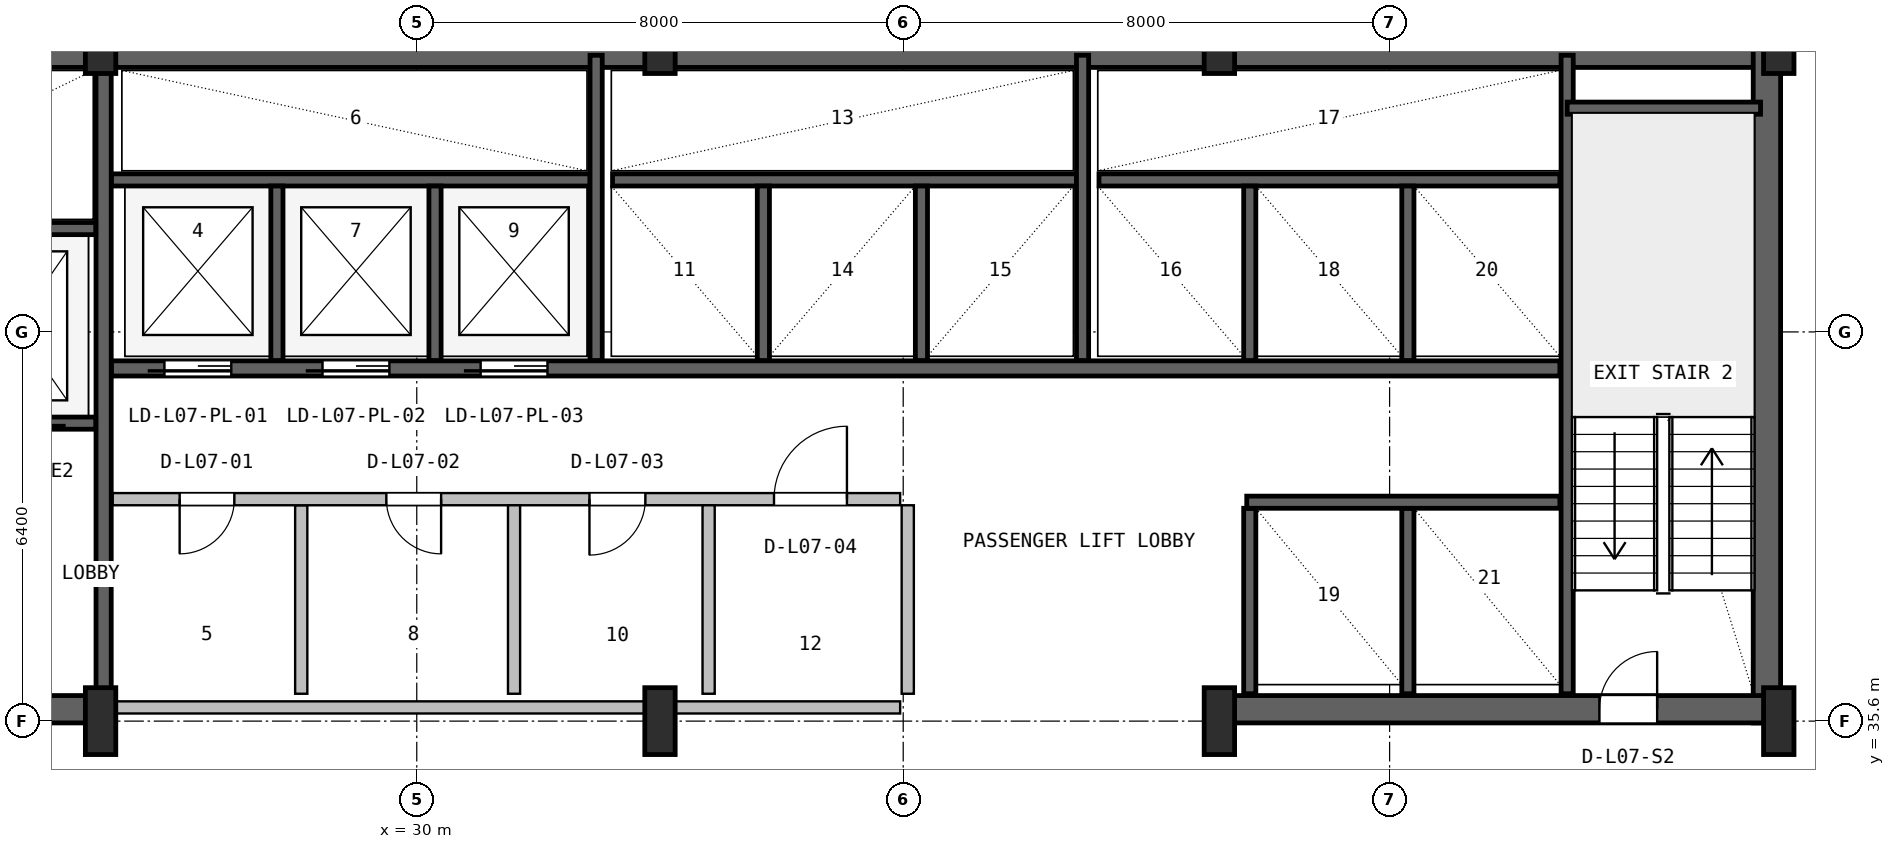
"""IFC4 building model, lengths in metres.
Left out: names, types, materials, properties, quantities, classifications, styles, units other than length and angle.
Written with IfcOpenShell. Run it as: python <this file> out.ifc"""

import sys

from ifc_helpers import new_model, si_unit, direction, frame, frame_2d, origin, origin_2d, place, context, subcontext, project, spatial, rectangle, i_section, extrude, source, transform, mapped, element, fill, save


model = new_model("IFC4")
c1 = context("Model", 3, precision=1e-05, world=origin(), true_north=direction((0.0, 1.0)))
c2 = subcontext(c1, "Body", "Model", "MODEL_VIEW")
j1 = project(units=[si_unit("LENGTHUNIT", "METRE"), si_unit("PLANEANGLEUNIT", "RADIAN")], contexts=[c1])
p1 = place(None, origin())
s1 = spatial("IfcSite", under=j1, at=p1, CompositionType="ELEMENT")
p2 = place(p1, origin())
s2 = spatial("IfcBuilding", under=s1, at=p2, CompositionType="ELEMENT")
p3 = place(p2, frame((0.0, 0.0, 35.4)))
s3 = spatial("IfcBuildingStorey", under=s2, at=p3, CompositionType="ELEMENT", Elevation=35.4)
p4 = place(p3, frame((15.6, 46.575, 0.0), z_axis=(0.0, 0.0, 1.0), x_axis=(1.0, 0.0, 0.0)))
e1 = element("IfcWall", 1, at=p4, inside=s3, PredefinedType="SHEAR", context=c2, shape_type="SweptSolid", body=[
    extrude(rectangle(XDim=36.8, YDim=0.45, at=frame_2d((18.4, 0.0))), origin(), (0.0, 0.0, 1.0), 3.65),
])
p5 = place(p3, frame((52.205, 35.57, 0.0), z_axis=(0.0, 0.0, 1.0), x_axis=(0.0, 1.0, 0.0)))
e2 = element("IfcWall", 2, at=p5, inside=s3, PredefinedType="SHEAR", context=c2, shape_type="SweptSolid", body=[
    extrude(rectangle(XDim=11.23, YDim=0.45, at=frame_2d((5.615, 0.0))), origin(), (0.0, 0.0, 1.0), 3.65),
])
p6 = place(p3, frame((15.57, 35.795, 0.0), z_axis=(0.0, 0.0, 1.0), x_axis=(1.0, 0.0, 0.0)))
e3 = element("IfcWall", 3, at=p6, inside=s3, PredefinedType="SHEAR", context=c2, shape_type="SweptSolid", body=[
    extrude(rectangle(XDim=9.23, YDim=0.45, at=frame_2d((4.615, 0.0))), origin(), (0.0, 0.0, 1.0), 3.65),
])
p7 = place(p6, frame((5.4, 0.0, 0.0)))
e4 = element("IfcOpeningElement", 4, at=p7, cuts=e3, PredefinedType="OPENING", context=c2, shape_type="SweptSolid", body=[
    extrude(rectangle(XDim=1.0, YDim=2.1, at=frame_2d((0.5, 1.05))), frame((0.0, 0.235, 0.0), z_axis=(0.0, -1.0, 0.0), x_axis=(1.0, 0.0, 0.0)), (0.0, 0.0, 1.0), 0.47),
])
p8 = place(p3, frame((43.2, 35.795, 0.0), z_axis=(0.0, 0.0, 1.0), x_axis=(1.0, 0.0, 0.0)))
e5 = element("IfcWall", 5, at=p8, inside=s3, PredefinedType="SHEAR", context=c2, shape_type="SweptSolid", body=[
    extrude(rectangle(XDim=9.23, YDim=0.45, at=frame_2d((4.615, 0.0))), origin(), (0.0, 0.0, 1.0), 3.65),
])
p9 = place(p8, frame((6.25, 0.0, 0.0)))
e6 = element("IfcOpeningElement", 6, at=p9, cuts=e5, PredefinedType="OPENING", context=c2, shape_type="SweptSolid", body=[
    extrude(rectangle(XDim=0.95, YDim=2.1, at=frame_2d((0.475, 1.05))), frame((0.0, 0.235, 0.0), z_axis=(0.0, -1.0, 0.0), x_axis=(1.0, 0.0, 0.0)), (0.0, 0.0, 1.0), 0.47),
])
m1 = source(origin(), c2, "Body", "SweptSolid", [
    extrude(i_section(OverallWidth=0.5, OverallDepth=1.1, WebThickness=0.018, FlangeThickness=0.032, FilletRadius=0.018, at=origin_2d()), origin(), (0.0, 0.0, 1.0), 3.9),
])
for number, where, z_axis, x_axis in (
    (7, (24.8, 35.6, 0.0), (0.0, 0.0, 1.0), (1.0, 0.0, 0.0)),
    (8, (24.8, 46.8, 0.0), (0.0, 0.0, 1.0), (1.0, 0.0, 0.0)),
    (9, (34.0, 35.6, 0.0), (0.0, 0.0, 1.0), (1.0, 0.0, 0.0)),
    (10, (34.0, 46.8, 0.0), (0.0, 0.0, 1.0), (1.0, 0.0, 0.0)),
    (11, (43.2, 35.6, 0.0), (0.0, 0.0, 1.0), (1.0, 0.0, 0.0)),
    (12, (43.2, 46.8, 0.0), (0.0, 0.0, 1.0), (1.0, 0.0, 0.0)),
    (13, (52.4, 35.6, 0.0), (0.0, 0.0, 1.0), (1.0, 0.0, 0.0)),
    (14, (52.4, 46.8, 0.0), (0.0, 0.0, 1.0), (1.0, 0.0, 0.0)),
):
    element("IfcColumn", number, at=place(p3, frame(where, z_axis=z_axis, x_axis=x_axis)), inside=s3, PredefinedType="COLUMN", context=c2, shape_type="MappedRepresentation", body=[
        mapped(m1, transform((0.0, 0.0, 0.0), x_axis=(1.0, 0.0, 0.0), y_axis=(0.0, 1.0, 0.0), z_axis=(0.0, 0.0, 1.0), scale=1.0)),
    ])
p10 = place(p3, frame((24.85, 36.05, 0.0), z_axis=(0.0, 0.0, 1.0), x_axis=(0.0, 1.0, 0.0)))
e15 = element("IfcWall", 15, at=p10, inside=s3, PredefinedType="SHEAR", context=c2, shape_type="SweptSolid", body=[
    extrude(rectangle(XDim=10.45, YDim=0.25, at=frame_2d((5.225, 0.0))), origin(), (0.0, 0.0, 1.0), 3.65),
])
p11 = place(p3, frame((19.2, 40.5, 0.0), z_axis=(0.0, 0.0, 1.0), x_axis=(1.0, 0.0, 0.0)))
e16 = element("IfcWall", 16, at=p11, inside=s3, PredefinedType="SHEAR", context=c2, shape_type="SweptSolid", body=[
    extrude(rectangle(XDim=5.52, YDim=0.2, at=frame_2d((2.76, 0.0))), origin(), (0.0, 0.0, 1.0), 3.65),
])
p12 = place(p11, frame((1.05, 0.0, 0.0)))
e17 = element("IfcOpeningElement", 17, at=p12, cuts=e16, PredefinedType="OPENING", context=c2, shape_type="SweptSolid", body=[
    extrude(rectangle(XDim=1.1, YDim=2.18, at=frame_2d((0.55, 1.09))), frame((0.0, 0.11, 0.0), z_axis=(0.0, -1.0, 0.0), x_axis=(1.0, 0.0, 0.0)), (0.0, 0.0, 1.0), 0.22),
])
p13 = place(p11, frame((3.65, 0.0, 0.0)))
e18 = element("IfcOpeningElement", 18, at=p13, cuts=e16, PredefinedType="OPENING", context=c2, shape_type="SweptSolid", body=[
    extrude(rectangle(XDim=1.1, YDim=2.18, at=frame_2d((0.55, 1.09))), frame((0.0, 0.11, 0.0), z_axis=(0.0, -1.0, 0.0), x_axis=(1.0, 0.0, 0.0)), (0.0, 0.0, 1.0), 0.22),
])
p14 = place(p3, frame((19.2, 43.7, 0.0), z_axis=(0.0, 0.0, 1.0), x_axis=(1.0, 0.0, 0.0)))
e19 = element("IfcWall", 19, at=p14, inside=s3, PredefinedType="SHEAR", context=c2, shape_type="SweptSolid", body=[
    extrude(rectangle(XDim=5.52, YDim=0.2, at=frame_2d((2.76, 0.0))), origin(), (0.0, 0.0, 1.0), 3.65),
])
p15 = place(p3, frame((48.92, 36.05, 0.0), z_axis=(0.0, 0.0, 1.0), x_axis=(0.0, 1.0, 0.0)))
e20 = element("IfcWall", 20, at=p15, inside=s3, PredefinedType="SHEAR", context=c2, shape_type="SweptSolid", body=[
    extrude(rectangle(XDim=10.5, YDim=0.2, at=frame_2d((5.25, 0.0))), origin(), (0.0, 0.0, 1.0), 3.65),
])
p16 = place(p3, frame((48.92, 45.68, 0.0), z_axis=(0.0, 0.0, 1.0), x_axis=(1.0, 0.0, 0.0)))
e21 = element("IfcWall", 21, at=p16, inside=s3, PredefinedType="SHEAR", context=c2, shape_type="SweptSolid", body=[
    extrude(rectangle(XDim=3.18, YDim=0.2, at=frame_2d((1.59, 0.0))), origin(), (0.0, 0.0, 1.0), 3.65),
])
p17 = place(p3, frame((24.98, 41.4, 0.0), z_axis=(0.0, 0.0, 1.0), x_axis=(1.0, 0.0, 0.0)))
e22 = element("IfcWall", 22, at=p17, inside=s3, PredefinedType="SHEAR", context=c2, shape_type="SweptSolid", body=[
    extrude(rectangle(XDim=23.82, YDim=0.25, at=frame_2d((11.91, 0.0))), origin(), (0.0, 0.0, 1.0), 3.65),
])
p18 = place(p17, frame((0.87, 0.0, 0.0)))
e23 = element("IfcOpeningElement", 23, at=p18, cuts=e22, PredefinedType="OPENING", context=c2, shape_type="SweptSolid", body=[
    extrude(rectangle(XDim=1.1, YDim=2.18, at=frame_2d((0.55, 1.09))), frame((0.0, 0.135, 0.0), z_axis=(0.0, -1.0, 0.0), x_axis=(1.0, 0.0, 0.0)), (0.0, 0.0, 1.0), 0.27),
])
p19 = place(p17, frame((3.47, 0.0, 0.0)))
e24 = element("IfcOpeningElement", 24, at=p19, cuts=e22, PredefinedType="OPENING", context=c2, shape_type="SweptSolid", body=[
    extrude(rectangle(XDim=1.1, YDim=2.18, at=frame_2d((0.55, 1.09))), frame((0.0, 0.135, 0.0), z_axis=(0.0, -1.0, 0.0), x_axis=(1.0, 0.0, 0.0)), (0.0, 0.0, 1.0), 0.27),
])
p20 = place(p17, frame((6.07, 0.0, 0.0)))
e25 = element("IfcOpeningElement", 25, at=p20, cuts=e22, PredefinedType="OPENING", context=c2, shape_type="SweptSolid", body=[
    extrude(rectangle(XDim=1.1, YDim=2.18, at=frame_2d((0.55, 1.09))), frame((0.0, 0.135, 0.0), z_axis=(0.0, -1.0, 0.0), x_axis=(1.0, 0.0, 0.0)), (0.0, 0.0, 1.0), 0.27),
])
p21 = place(p3, frame((24.98, 44.5, 0.0), z_axis=(0.0, 0.0, 1.0), x_axis=(1.0, 0.0, 0.0)))
e26 = element("IfcWall", 26, at=p21, inside=s3, PredefinedType="SHEAR", context=c2, shape_type="SweptSolid", body=[
    extrude(rectangle(XDim=7.87, YDim=0.2, at=frame_2d((3.935, 0.0))), origin(), (0.0, 0.0, 1.0), 3.65),
])
for number, where, z_axis, x_axis in (
    (27, (27.7, 41.53, 0.0), (0.0, 0.0, 1.0), (0.0, 1.0, 0.0)),
    (28, (30.3, 41.53, 0.0), (0.0, 0.0, 1.0), (0.0, 1.0, 0.0)),
):
    element("IfcWall", number, at=place(p3, frame(where, z_axis=z_axis, x_axis=x_axis)), inside=s3, PredefinedType="SHEAR", context=c2, shape_type="SweptSolid", body=[
        extrude(rectangle(XDim=2.87, YDim=0.2, at=frame_2d((1.435, 0.0))), origin(), (0.0, 0.0, 1.0), 3.65),
    ])
p22 = place(p3, frame((32.95, 41.53, 0.0), z_axis=(0.0, 0.0, 1.0), x_axis=(0.0, 1.0, 0.0)))
e29 = element("IfcWall", 29, at=p22, inside=s3, PredefinedType="SHEAR", context=c2, shape_type="SweptSolid", body=[
    extrude(rectangle(XDim=5.02, YDim=0.2, at=frame_2d((2.51, 0.0))), origin(), (0.0, 0.0, 1.0), 3.65),
])
p23 = place(p3, frame((33.22, 44.5, 0.0), z_axis=(0.0, 0.0, 1.0), x_axis=(1.0, 0.0, 0.0)))
e30 = element("IfcWall", 30, at=p23, inside=s3, PredefinedType="SHEAR", context=c2, shape_type="SweptSolid", body=[
    extrude(rectangle(XDim=7.63, YDim=0.2, at=frame_2d((3.815, 0.0))), origin(), (0.0, 0.0, 1.0), 3.65),
])
for number, where, z_axis, x_axis in (
    (31, (35.7, 41.53, 0.0), (0.0, 0.0, 1.0), (0.0, 1.0, 0.0)),
    (32, (38.3, 41.53, 0.0), (0.0, 0.0, 1.0), (0.0, 1.0, 0.0)),
):
    element("IfcWall", number, at=place(p3, frame(where, z_axis=z_axis, x_axis=x_axis)), inside=s3, PredefinedType="SHEAR", context=c2, shape_type="SweptSolid", body=[
        extrude(rectangle(XDim=2.87, YDim=0.2, at=frame_2d((1.435, 0.0))), origin(), (0.0, 0.0, 1.0), 3.65),
    ])
p24 = place(p3, frame((40.95, 41.53, 0.0), z_axis=(0.0, 0.0, 1.0), x_axis=(0.0, 1.0, 0.0)))
e33 = element("IfcWall", 33, at=p24, inside=s3, PredefinedType="SHEAR", context=c2, shape_type="SweptSolid", body=[
    extrude(rectangle(XDim=5.02, YDim=0.2, at=frame_2d((2.51, 0.0))), origin(), (0.0, 0.0, 1.0), 3.65),
])
p25 = place(p3, frame((41.22, 44.5, 0.0), z_axis=(0.0, 0.0, 1.0), x_axis=(1.0, 0.0, 0.0)))
e34 = element("IfcWall", 34, at=p25, inside=s3, PredefinedType="SHEAR", context=c2, shape_type="SweptSolid", body=[
    extrude(rectangle(XDim=7.58, YDim=0.2, at=frame_2d((3.79, 0.0))), origin(), (0.0, 0.0, 1.0), 3.65),
])
for number, where, z_axis, x_axis in (
    (35, (43.7, 41.53, 0.0), (0.0, 0.0, 1.0), (0.0, 1.0, 0.0)),
    (36, (46.3, 41.53, 0.0), (0.0, 0.0, 1.0), (0.0, 1.0, 0.0)),
):
    element("IfcWall", number, at=place(p3, frame(where, z_axis=z_axis, x_axis=x_axis)), inside=s3, PredefinedType="SHEAR", context=c2, shape_type="SweptSolid", body=[
        extrude(rectangle(XDim=2.87, YDim=0.2, at=frame_2d((1.435, 0.0))), origin(), (0.0, 0.0, 1.0), 3.65),
    ])
for number, where, z_axis, x_axis in (
    (37, (43.7, 36.05, 0.0), (0.0, 0.0, 1.0), (0.0, 1.0, 0.0)),
    (38, (46.3, 36.05, 0.0), (0.0, 0.0, 1.0), (0.0, 1.0, 0.0)),
):
    element("IfcWall", number, at=place(p3, frame(where, z_axis=z_axis, x_axis=x_axis)), inside=s3, PredefinedType="SHEAR", context=c2, shape_type="SweptSolid", body=[
        extrude(rectangle(XDim=3.05, YDim=0.2, at=frame_2d((1.525, 0.0))), origin(), (0.0, 0.0, 1.0), 3.65),
    ])
p26 = place(p3, frame((43.65, 39.2, 0.0), z_axis=(0.0, 0.0, 1.0), x_axis=(1.0, 0.0, 0.0)))
e39 = element("IfcWall", 39, at=p26, inside=s3, PredefinedType="SHEAR", context=c2, shape_type="SweptSolid", body=[
    extrude(rectangle(XDim=5.15, YDim=0.2, at=frame_2d((2.575, 0.0))), origin(), (0.0, 0.0, 1.0), 3.65),
])
p27 = place(p3, frame((25.0, 35.825, 0.0), z_axis=(0.0, 0.0, 1.0), x_axis=(1.0, 0.0, 0.0)))
e40 = element("IfcWall", 40, at=p27, inside=s3, PredefinedType="SOLIDWALL", context=c2, shape_type="SweptSolid", body=[
    extrude(rectangle(XDim=12.95, YDim=0.2, at=frame_2d((6.475, 0.0))), origin(), (0.0, 0.0, 1.0), 2.425),
])
p28 = place(p3, frame((28.1, 36.05, 0.0), z_axis=(0.0, 0.0, 1.0), x_axis=(0.0, 1.0, 0.0)))
e41 = element("IfcWall", 41, at=p28, inside=s3, PredefinedType="PLUMBINGWALL", context=c2, shape_type="SweptSolid", body=[
    extrude(rectangle(XDim=3.1, YDim=0.2, at=frame_2d((1.55, 0.0))), origin(), (0.0, 0.0, 1.0), 3.63),
])
p29 = place(p3, frame((25.0, 39.25, 0.0), z_axis=(0.0, 0.0, 1.0), x_axis=(1.0, 0.0, 0.0)))
e42 = element("IfcWall", 42, at=p29, inside=s3, PredefinedType="SOLIDWALL", context=c2, shape_type="SweptSolid", body=[
    extrude(rectangle(XDim=12.95, YDim=0.2, at=frame_2d((6.475, 0.0))), origin(), (0.0, 0.0, 1.0), 3.63),
])
p30 = place(p29, frame((1.1, 0.0, 0.0)))
e43 = element("IfcOpeningElement", 43, at=p30, cuts=e42, PredefinedType="OPENING", context=c2, shape_type="SweptSolid", body=[
    extrude(rectangle(XDim=0.9, YDim=2.06, at=frame_2d((0.45, 1.03))), frame((0.0, 0.11, 0.0), z_axis=(0.0, -1.0, 0.0), x_axis=(1.0, 0.0, 0.0)), (0.0, 0.0, 1.0), 0.22),
])
p31 = place(p29, frame((4.5, 0.0, 0.0)))
e44 = element("IfcOpeningElement", 44, at=p31, cuts=e42, PredefinedType="OPENING", context=c2, shape_type="SweptSolid", body=[
    extrude(rectangle(XDim=0.9, YDim=2.06, at=frame_2d((0.45, 1.03))), frame((0.0, 0.11, 0.0), z_axis=(0.0, -1.0, 0.0), x_axis=(1.0, 0.0, 0.0)), (0.0, 0.0, 1.0), 0.22),
])
p32 = place(p29, frame((7.84, 0.0, 0.0)))
e45 = element("IfcOpeningElement", 45, at=p32, cuts=e42, PredefinedType="OPENING", context=c2, shape_type="SweptSolid", body=[
    extrude(rectangle(XDim=0.92, YDim=2.08, at=frame_2d((0.46, 1.04))), frame((0.0, 0.11, 0.0), z_axis=(0.0, -1.0, 0.0), x_axis=(1.0, 0.0, 0.0)), (0.0, 0.0, 1.0), 0.22),
])
p33 = place(p29, frame((10.875, 0.0, 0.0)))
e46 = element("IfcOpeningElement", 46, at=p33, cuts=e42, PredefinedType="OPENING", context=c2, shape_type="SweptSolid", body=[
    extrude(rectangle(XDim=1.2, YDim=2.1, at=frame_2d((0.6, 1.05))), frame((0.0, 0.11, 0.0), z_axis=(0.0, -1.0, 0.0), x_axis=(1.0, 0.0, 0.0)), (0.0, 0.0, 1.0), 0.22),
])
p34 = place(p3, frame((31.6, 36.05, 0.0), z_axis=(0.0, 0.0, 1.0), x_axis=(0.0, 1.0, 0.0)))
e47 = element("IfcWall", 47, at=p34, inside=s3, PredefinedType="PLUMBINGWALL", context=c2, shape_type="SweptSolid", body=[
    extrude(rectangle(XDim=3.1, YDim=0.2, at=frame_2d((1.55, 0.0))), origin(), (0.0, 0.0, 1.0), 3.63),
])
for number, where, z_axis, x_axis in (
    (48, (34.8, 36.05, 0.0), (0.0, 0.0, 1.0), (0.0, 1.0, 0.0)),
    (49, (38.075, 36.05, 0.0), (0.0, 0.0, 1.0), (0.0, 1.0, 0.0)),
):
    element("IfcWall", number, at=place(p3, frame(where, z_axis=z_axis, x_axis=x_axis)), inside=s3, PredefinedType="SOLIDWALL", context=c2, shape_type="SweptSolid", body=[
        extrude(rectangle(XDim=3.1, YDim=0.2, at=frame_2d((1.55, 0.0))), origin(), (0.0, 0.0, 1.0), 3.63),
    ])
m2 = source(origin(), c2, "Body", "SweptSolid", [
    extrude(rectangle(XDim=0.95, YDim=2.1, at=frame_2d((0.475, 1.05))), frame((0.0, 0.025, 0.0), z_axis=(0.0, -1.0, 0.0), x_axis=(1.0, 0.0, 0.0)), (0.0, 0.0, 1.0), 0.05),
])
p35 = place(p9, origin())
e50 = element("IfcDoor", 50, at=p35, inside=s3, OperationType="SINGLE_SWING_RIGHT", PredefinedType="DOOR", context=c2, shape_type="MappedRepresentation", body=[
    mapped(m2, transform((0.0, 0.0, 0.0), x_axis=(1.0, 0.0, 0.0), y_axis=(0.0, 1.0, 0.0), z_axis=(0.0, 0.0, 1.0), scale=1.0)),
])
fill(e6, e50)
m3 = source(origin(), c2, "Body", "SweptSolid", [
    extrude(rectangle(XDim=1.1, YDim=2.18, at=frame_2d((0.55, 1.09))), frame((0.0, 0.025, 0.0), z_axis=(0.0, -1.0, 0.0), x_axis=(1.0, 0.0, 0.0)), (0.0, 0.0, 1.0), 0.05),
])
p36 = place(p18, frame((1.1, 0.0, 0.0), z_axis=(0.0, 0.0, 1.0), x_axis=(-1.0, 0.0, 0.0)))
e51 = element("IfcDoor", 51, at=p36, inside=s3, OperationType="SLIDING_TO_LEFT", PredefinedType="DOOR", context=c2, shape_type="MappedRepresentation", body=[
    mapped(m3, transform((0.0, 0.0, 0.0), x_axis=(1.0, 0.0, 0.0), y_axis=(0.0, 1.0, 0.0), z_axis=(0.0, 0.0, 1.0), scale=1.0)),
])
fill(e23, e51)
p37 = place(p19, frame((1.1, 0.0, 0.0), z_axis=(0.0, 0.0, 1.0), x_axis=(-1.0, 0.0, 0.0)))
e52 = element("IfcDoor", 52, at=p37, inside=s3, OperationType="SLIDING_TO_LEFT", PredefinedType="DOOR", context=c2, shape_type="MappedRepresentation", body=[
    mapped(m3, transform((0.0, 0.0, 0.0), x_axis=(1.0, 0.0, 0.0), y_axis=(0.0, 1.0, 0.0), z_axis=(0.0, 0.0, 1.0), scale=1.0)),
])
fill(e24, e52)
p38 = place(p20, frame((1.1, 0.0, 0.0), z_axis=(0.0, 0.0, 1.0), x_axis=(-1.0, 0.0, 0.0)))
e53 = element("IfcDoor", 53, at=p38, inside=s3, OperationType="SLIDING_TO_LEFT", PredefinedType="DOOR", context=c2, shape_type="MappedRepresentation", body=[
    mapped(m3, transform((0.0, 0.0, 0.0), x_axis=(1.0, 0.0, 0.0), y_axis=(0.0, 1.0, 0.0), z_axis=(0.0, 0.0, 1.0), scale=1.0)),
])
fill(e25, e53)
m4 = source(origin(), c2, "Body", "SweptSolid", [
    extrude(rectangle(XDim=0.9, YDim=2.06, at=frame_2d((0.45, 1.03))), frame((0.0, 0.025, 0.0), z_axis=(0.0, -1.0, 0.0), x_axis=(1.0, 0.0, 0.0)), (0.0, 0.0, 1.0), 0.05),
])
p39 = place(p30, frame((0.9, 0.0, 0.0), z_axis=(0.0, 0.0, 1.0), x_axis=(-1.0, 0.0, 0.0)))
e54 = element("IfcDoor", 54, at=p39, inside=s3, OperationType="SINGLE_SWING_LEFT", PredefinedType="DOOR", context=c2, shape_type="MappedRepresentation", body=[
    mapped(m4, transform((0.0, 0.0, 0.0), x_axis=(1.0, 0.0, 0.0), y_axis=(0.0, 1.0, 0.0), z_axis=(0.0, 0.0, 1.0), scale=1.0)),
])
fill(e43, e54)
p40 = place(p31, frame((0.9, 0.0, 0.0), z_axis=(0.0, 0.0, 1.0), x_axis=(-1.0, 0.0, 0.0)))
e55 = element("IfcDoor", 55, at=p40, inside=s3, OperationType="SINGLE_SWING_RIGHT", PredefinedType="DOOR", context=c2, shape_type="MappedRepresentation", body=[
    mapped(m4, transform((0.0, 0.0, 0.0), x_axis=(1.0, 0.0, 0.0), y_axis=(0.0, 1.0, 0.0), z_axis=(0.0, 0.0, 1.0), scale=1.0)),
])
fill(e44, e55)
m5 = source(origin(), c2, "Body", "SweptSolid", [
    extrude(rectangle(XDim=0.92, YDim=2.08, at=frame_2d((0.46, 1.04))), frame((0.0, 0.025, 0.0), z_axis=(0.0, -1.0, 0.0), x_axis=(1.0, 0.0, 0.0)), (0.0, 0.0, 1.0), 0.05),
])
p41 = place(p32, frame((0.92, 0.0, 0.0), z_axis=(0.0, 0.0, 1.0), x_axis=(-1.0, 0.0, 0.0)))
e56 = element("IfcDoor", 56, at=p41, inside=s3, OperationType="SINGLE_SWING_LEFT", PredefinedType="DOOR", context=c2, shape_type="MappedRepresentation", body=[
    mapped(m5, transform((0.0, 0.0, 0.0), x_axis=(1.0, 0.0, 0.0), y_axis=(0.0, 1.0, 0.0), z_axis=(0.0, 0.0, 1.0), scale=1.0)),
])
fill(e45, e56)
m6 = source(origin(), c2, "Body", "SweptSolid", [
    extrude(rectangle(XDim=1.2, YDim=2.1, at=frame_2d((0.6, 1.05))), frame((0.0, 0.025, 0.0), z_axis=(0.0, -1.0, 0.0), x_axis=(1.0, 0.0, 0.0)), (0.0, 0.0, 1.0), 0.05),
])
p42 = place(p33, origin())
e57 = element("IfcDoor", 57, at=p42, inside=s3, OperationType="SINGLE_SWING_RIGHT", PredefinedType="DOOR", context=c2, shape_type="MappedRepresentation", body=[
    mapped(m6, transform((0.0, 0.0, 0.0), x_axis=(1.0, 0.0, 0.0), y_axis=(0.0, 1.0, 0.0), z_axis=(0.0, 0.0, 1.0), scale=1.0)),
])
fill(e46, e57)
save(model, sys.argv[1])
